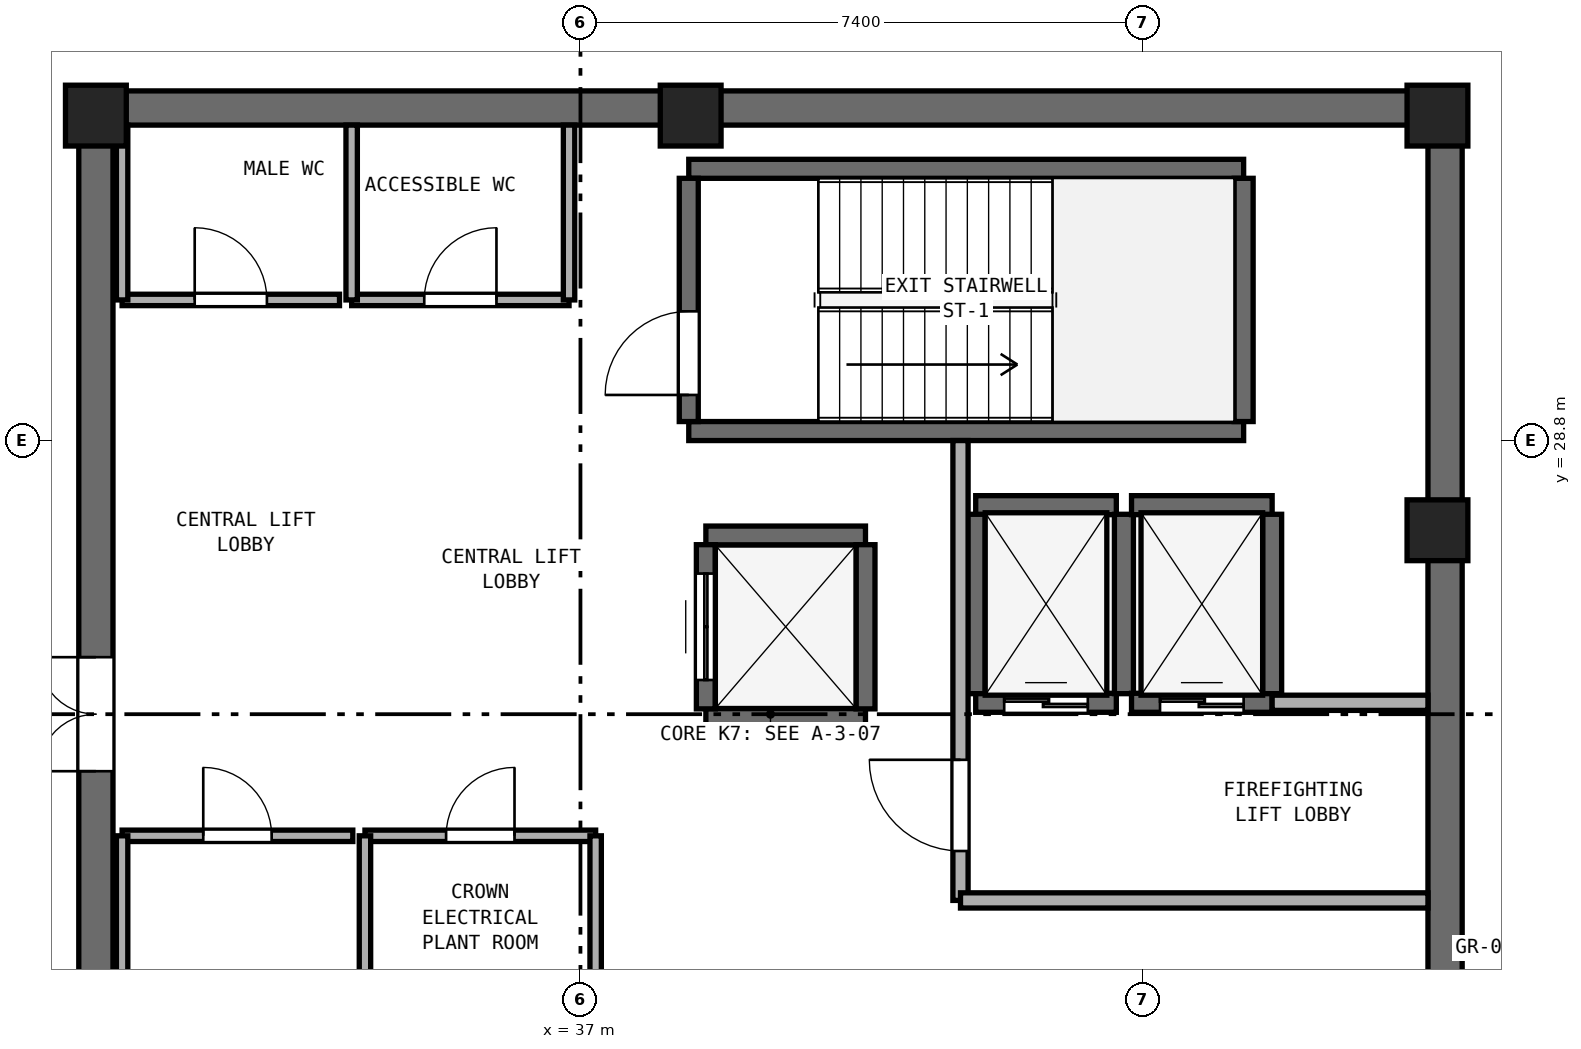
"""IFC4 building model, lengths in metres.
Left out: names, types, materials, properties, quantities, classifications, styles, units other than length and angle.
Written with IfcOpenShell. Run it as: python <this file> out.ifc"""

import sys

from ifc_helpers import new_model, si_unit, direction, frame, frame_2d, origin, origin_2d, place, context, subcontext, project, spatial, rectangle, extrude, element, fill, save


model = new_model("IFC4")
c1 = context("Model", 3, precision=1e-05, world=origin(), true_north=direction((0.0, 1.0)))
c2 = subcontext(c1, "Body", "Model", "MODEL_VIEW")
j1 = project(units=[si_unit("LENGTHUNIT", "METRE"), si_unit("PLANEANGLEUNIT", "RADIAN")], contexts=[c1])
p1 = place(None, origin())
s1 = spatial("IfcSite", under=j1, at=p1, CompositionType="ELEMENT")
p2 = place(p1, origin())
s2 = spatial("IfcBuilding", under=s1, at=p2, CompositionType="ELEMENT")
p3 = place(p2, frame((0.0, 0.0, 317.4)))
s3 = spatial("IfcBuildingStorey", under=s2, at=p3, CompositionType="ELEMENT", Elevation=317.4)
p4 = place(p3, frame((30.4, 33.175, 0.0), z_axis=(0.0, 0.0, 1.0), x_axis=(1.0, 0.0, 0.0)))
e1 = element("IfcWall", 1, at=p4, inside=s3, PredefinedType="SHEAR", context=c2, shape_type="SweptSolid", body=[
    extrude(rectangle(XDim=18.2, YDim=0.45, at=frame_2d((9.1, 0.0))), origin(), (0.0, 0.0, 1.0), 3.72),
])
p5 = place(p3, frame((30.625, 17.45, 0.0), z_axis=(0.0, 0.0, 1.0), x_axis=(0.0, 1.0, 0.0)))
e2 = element("IfcWall", 2, at=p5, inside=s3, PredefinedType="SHEAR", context=c2, shape_type="SweptSolid", body=[
    extrude(rectangle(XDim=15.5, YDim=0.45, at=frame_2d((7.75, 0.0))), origin(), (0.0, 0.0, 1.0), 3.72),
])
p6 = place(p5, frame((7.0, 0.0, 0.0)))
e3 = element("IfcOpeningElement", 3, at=p6, cuts=e2, PredefinedType="OPENING", context=c2, shape_type="SweptSolid", body=[
    extrude(rectangle(XDim=1.5, YDim=2.15, at=frame_2d((0.75, 1.075))), frame((0.0, 0.235, 0.0), z_axis=(0.0, -1.0, 0.0), x_axis=(1.0, 0.0, 0.0)), (0.0, 0.0, 1.0), 0.47),
])
p7 = place(p3, frame((48.375, 17.45, 0.0), z_axis=(0.0, 0.0, 1.0), x_axis=(0.0, 1.0, 0.0)))
e4 = element("IfcWall", 4, at=p7, inside=s3, PredefinedType="SHEAR", context=c2, shape_type="SweptSolid", body=[
    extrude(rectangle(XDim=15.5, YDim=0.45, at=frame_2d((7.75, 0.0))), origin(), (0.0, 0.0, 1.0), 3.72),
])
p8 = place(p7, frame((2.55, 0.0, 0.0)))
e5 = element("IfcOpeningElement", 5, at=p8, cuts=e4, PredefinedType="OPENING", context=c2, shape_type="SweptSolid", body=[
    extrude(rectangle(XDim=1.5, YDim=2.15, at=frame_2d((0.75, 1.075))), frame((0.0, 0.235, 0.0), z_axis=(0.0, -1.0, 0.0), x_axis=(1.0, 0.0, 0.0)), (0.0, 0.0, 1.0), 0.47),
])
for number, where, z_axis, x_axis in (
    (6, (48.275, 27.62, 0.0), (0.0, 0.0, 1.0), (1.0, 0.0, 0.0)),
    (7, (48.275, 33.075, 0.0), (0.0, 0.0, 1.0), (1.0, 0.0, 0.0)),
    (8, (38.45, 33.075, 0.0), (0.0, 0.0, 1.0), (1.0, 0.0, 0.0)),
    (9, (30.625, 33.075, 0.0), (0.0, 0.0, 1.0), (1.0, 0.0, 0.0)),
):
    element("IfcColumn", number, at=place(p3, frame(where, z_axis=z_axis, x_axis=x_axis)), inside=s3, PredefinedType="PILASTER", context=c2, shape_type="SweptSolid", body=[
        extrude(rectangle(XDim=0.8, YDim=0.8, at=origin_2d()), origin(), (0.0, 0.0, 1.0), 4.0),
    ])
for number, where, z_axis, x_axis in (
    (10, (38.425, 28.925, 0.0), (0.0, 0.0, 1.0), (1.0, 0.0, 0.0)),
    (11, (38.425, 32.375, 0.0), (0.0, 0.0, 1.0), (1.0, 0.0, 0.0)),
):
    element("IfcWall", number, at=place(p3, frame(where, z_axis=z_axis, x_axis=x_axis)), inside=s3, PredefinedType="SHEAR", context=c2, shape_type="SweptSolid", body=[
        extrude(rectangle(XDim=7.3, YDim=0.25, at=frame_2d((3.65, 0.0))), origin(), (0.0, 0.0, 1.0), 3.72),
    ])
p9 = place(p3, frame((38.425, 29.05, 0.0), z_axis=(0.0, 0.0, 1.0), x_axis=(0.0, 1.0, 0.0)))
e12 = element("IfcWall", 12, at=p9, inside=s3, PredefinedType="SHEAR", context=c2, shape_type="SweptSolid", body=[
    extrude(rectangle(XDim=3.2, YDim=0.25, at=frame_2d((1.6, 0.0))), origin(), (0.0, 0.0, 1.0), 3.72),
])
p10 = place(p9, frame((0.35, 0.0, 0.0)))
e13 = element("IfcOpeningElement", 13, at=p10, cuts=e12, PredefinedType="OPENING", context=c2, shape_type="SweptSolid", body=[
    extrude(rectangle(XDim=1.1, YDim=2.15, at=frame_2d((0.55, 1.075))), frame((0.0, 0.135, 0.0), z_axis=(0.0, -1.0, 0.0), x_axis=(1.0, 0.0, 0.0)), (0.0, 0.0, 1.0), 0.27),
])
p11 = place(p3, frame((45.725, 29.05, 0.0), z_axis=(0.0, 0.0, 1.0), x_axis=(0.0, 1.0, 0.0)))
e14 = element("IfcWall", 14, at=p11, inside=s3, PredefinedType="SHEAR", context=c2, shape_type="SweptSolid", body=[
    extrude(rectangle(XDim=3.2, YDim=0.25, at=frame_2d((1.6, 0.0))), origin(), (0.0, 0.0, 1.0), 3.72),
])
p12 = place(p3, frame((42.2, 25.35, 0.0), z_axis=(0.0, 0.0, 1.0), x_axis=(1.0, 0.0, 0.0)))
e15 = element("IfcWall", 15, at=p12, inside=s3, PredefinedType="SHEAR", context=c2, shape_type="SweptSolid", body=[
    extrude(rectangle(XDim=1.85, YDim=0.25, at=frame_2d((0.925, 0.0))), origin(), (0.0, 0.0, 1.0), 3.72),
])
p13 = place(p12, frame((0.375, 0.0, 0.0)))
e16 = element("IfcOpeningElement", 16, at=p13, cuts=e15, PredefinedType="OPENING", context=c2, shape_type="SweptSolid", body=[
    extrude(rectangle(XDim=1.1, YDim=2.15, at=frame_2d((0.55, 1.075))), frame((0.0, 0.135, 0.0), z_axis=(0.0, -1.0, 0.0), x_axis=(1.0, 0.0, 0.0)), (0.0, 0.0, 1.0), 0.27),
])
p14 = place(p3, frame((42.2, 27.95, 0.0), z_axis=(0.0, 0.0, 1.0), x_axis=(1.0, 0.0, 0.0)))
e17 = element("IfcWall", 17, at=p14, inside=s3, PredefinedType="SHEAR", context=c2, shape_type="SweptSolid", body=[
    extrude(rectangle(XDim=1.85, YDim=0.25, at=frame_2d((0.925, 0.0))), origin(), (0.0, 0.0, 1.0), 3.72),
])
for number, where, z_axis, x_axis in (
    (18, (42.2, 25.47, 0.0), (0.0, 0.0, 1.0), (0.0, 1.0, 0.0)),
    (19, (44.15, 25.47, 0.0), (0.0, 0.0, 1.0), (0.0, 1.0, 0.0)),
):
    element("IfcWall", number, at=place(p3, frame(where, z_axis=z_axis, x_axis=x_axis)), inside=s3, PredefinedType="SHEAR", context=c2, shape_type="SweptSolid", body=[
        extrude(rectangle(XDim=2.36, YDim=0.25, at=frame_2d((1.18, 0.0))), origin(), (0.0, 0.0, 1.0), 3.72),
    ])
p15 = place(p3, frame((44.25, 25.35, 0.0), z_axis=(0.0, 0.0, 1.0), x_axis=(1.0, 0.0, 0.0)))
e20 = element("IfcWall", 20, at=p15, inside=s3, PredefinedType="SHEAR", context=c2, shape_type="SweptSolid", body=[
    extrude(rectangle(XDim=1.85, YDim=0.25, at=frame_2d((0.925, 0.0))), origin(), (0.0, 0.0, 1.0), 3.72),
])
p16 = place(p15, frame((0.375, 0.0, 0.0)))
e21 = element("IfcOpeningElement", 21, at=p16, cuts=e20, PredefinedType="OPENING", context=c2, shape_type="SweptSolid", body=[
    extrude(rectangle(XDim=1.1, YDim=2.15, at=frame_2d((0.55, 1.075))), frame((0.0, 0.135, 0.0), z_axis=(0.0, -1.0, 0.0), x_axis=(1.0, 0.0, 0.0)), (0.0, 0.0, 1.0), 0.27),
])
p17 = place(p3, frame((44.25, 27.95, 0.0), z_axis=(0.0, 0.0, 1.0), x_axis=(1.0, 0.0, 0.0)))
e22 = element("IfcWall", 22, at=p17, inside=s3, PredefinedType="SHEAR", context=c2, shape_type="SweptSolid", body=[
    extrude(rectangle(XDim=1.85, YDim=0.25, at=frame_2d((0.925, 0.0))), origin(), (0.0, 0.0, 1.0), 3.72),
])
p18 = place(p3, frame((46.1, 25.47, 0.0), z_axis=(0.0, 0.0, 1.0), x_axis=(0.0, 1.0, 0.0)))
e23 = element("IfcWall", 23, at=p18, inside=s3, PredefinedType="SHEAR", context=c2, shape_type="SweptSolid", body=[
    extrude(rectangle(XDim=2.36, YDim=0.25, at=frame_2d((1.18, 0.0))), origin(), (0.0, 0.0, 1.0), 3.72),
])
for number, where, z_axis, x_axis in (
    (24, (38.65, 25.15, 0.0), (0.0, 0.0, 1.0), (1.0, 0.0, 0.0)),
    (25, (38.65, 27.55, 0.0), (0.0, 0.0, 1.0), (1.0, 0.0, 0.0)),
):
    element("IfcWall", number, at=place(p3, frame(where, z_axis=z_axis, x_axis=x_axis)), inside=s3, PredefinedType="SHEAR", context=c2, shape_type="SweptSolid", body=[
        extrude(rectangle(XDim=2.1, YDim=0.25, at=frame_2d((1.05, 0.0))), origin(), (0.0, 0.0, 1.0), 3.72),
    ])
p19 = place(p3, frame((38.65, 25.27, 0.0), z_axis=(0.0, 0.0, 1.0), x_axis=(0.0, 1.0, 0.0)))
e26 = element("IfcWall", 26, at=p19, inside=s3, PredefinedType="SHEAR", context=c2, shape_type="SweptSolid", body=[
    extrude(rectangle(XDim=2.16, YDim=0.25, at=frame_2d((1.08, 0.0))), origin(), (0.0, 0.0, 1.0), 3.72),
])
p20 = place(p19, frame((0.38, 0.0, 0.0)))
e27 = element("IfcOpeningElement", 27, at=p20, cuts=e26, PredefinedType="OPENING", context=c2, shape_type="SweptSolid", body=[
    extrude(rectangle(XDim=1.4, YDim=2.2, at=frame_2d((0.7, 1.1))), frame((0.0, 0.135, 0.0), z_axis=(0.0, -1.0, 0.0), x_axis=(1.0, 0.0, 0.0)), (0.0, 0.0, 1.0), 0.27),
])
p21 = place(p3, frame((40.75, 25.27, 0.0), z_axis=(0.0, 0.0, 1.0), x_axis=(0.0, 1.0, 0.0)))
e28 = element("IfcWall", 28, at=p21, inside=s3, PredefinedType="SHEAR", context=c2, shape_type="SweptSolid", body=[
    extrude(rectangle(XDim=2.16, YDim=0.25, at=frame_2d((1.08, 0.0))), origin(), (0.0, 0.0, 1.0), 3.72),
])
p22 = place(p3, frame((42.0, 22.75, 0.0), z_axis=(0.0, 0.0, 1.0), x_axis=(0.0, 1.0, 0.0)))
e29 = element("IfcWall", 29, at=p22, inside=s3, PredefinedType="SOLIDWALL", context=c2, shape_type="SweptSolid", body=[
    extrude(rectangle(XDim=6.05, YDim=0.2, at=frame_2d((3.025, 0.0))), origin(), (0.0, 0.0, 1.0), 3.72),
])
p23 = place(p22, frame((0.65, 0.0, 0.0)))
e30 = element("IfcOpeningElement", 30, at=p23, cuts=e29, PredefinedType="OPENING", context=c2, shape_type="SweptSolid", body=[
    extrude(rectangle(XDim=1.2, YDim=2.15, at=frame_2d((0.6, 1.075))), frame((0.0, 0.11, 0.0), z_axis=(0.0, -1.0, 0.0), x_axis=(1.0, 0.0, 0.0)), (0.0, 0.0, 1.0), 0.22),
])
p24 = place(p3, frame((42.0, 22.75, 0.0), z_axis=(0.0, 0.0, 1.0), x_axis=(1.0, 0.0, 0.0)))
e31 = element("IfcWall", 31, at=p24, inside=s3, PredefinedType="SOLIDWALL", context=c2, shape_type="SweptSolid", body=[
    extrude(rectangle(XDim=6.15, YDim=0.2, at=frame_2d((3.075, 0.0))), origin(), (0.0, 0.0, 1.0), 3.72),
])
p25 = place(p3, frame((46.1, 25.35, 0.0), z_axis=(0.0, 0.0, 1.0), x_axis=(1.0, 0.0, 0.0)))
e32 = element("IfcWall", 32, at=p25, inside=s3, PredefinedType="SOLIDWALL", context=c2, shape_type="SweptSolid", body=[
    extrude(rectangle(XDim=2.05, YDim=0.2, at=frame_2d((1.025, 0.0))), origin(), (0.0, 0.0, 1.0), 3.72),
])
p26 = place(p3, frame((30.97, 30.65, 0.0), z_axis=(0.0, 0.0, 1.0), x_axis=(1.0, 0.0, 0.0)))
e33 = element("IfcWall", 33, at=p26, inside=s3, PredefinedType="PARTITIONING", context=c2, shape_type="SweptSolid", body=[
    extrude(rectangle(XDim=2.86, YDim=0.15, at=frame_2d((1.43, 0.0))), origin(), (0.0, 0.0, 1.0), 3.72),
])
p27 = place(p26, frame((0.955, 0.0, 0.0)))
e34 = element("IfcOpeningElement", 34, at=p27, cuts=e33, PredefinedType="OPENING", context=c2, shape_type="SweptSolid", body=[
    extrude(rectangle(XDim=0.95, YDim=2.1, at=frame_2d((0.475, 1.05))), frame((0.0, 0.085, 0.0), z_axis=(0.0, -1.0, 0.0), x_axis=(1.0, 0.0, 0.0)), (0.0, 0.0, 1.0), 0.17),
])
p28 = place(p3, frame((30.97, 30.65, 0.0), z_axis=(0.0, 0.0, 1.0), x_axis=(0.0, 1.0, 0.0)))
e35 = element("IfcWall", 35, at=p28, inside=s3, PredefinedType="PARTITIONING", context=c2, shape_type="SweptSolid", body=[
    extrude(rectangle(XDim=2.3, YDim=0.15, at=frame_2d((1.15, 0.0))), origin(), (0.0, 0.0, 1.0), 2.82),
])
p29 = place(p3, frame((33.99, 30.65, 0.0), z_axis=(0.0, 0.0, 1.0), x_axis=(1.0, 0.0, 0.0)))
e36 = element("IfcWall", 36, at=p29, inside=s3, PredefinedType="PARTITIONING", context=c2, shape_type="SweptSolid", body=[
    extrude(rectangle(XDim=2.86, YDim=0.15, at=frame_2d((1.43, 0.0))), origin(), (0.0, 0.0, 1.0), 3.72),
])
p30 = place(p29, frame((0.955, 0.0, 0.0)))
e37 = element("IfcOpeningElement", 37, at=p30, cuts=e36, PredefinedType="OPENING", context=c2, shape_type="SweptSolid", body=[
    extrude(rectangle(XDim=0.95, YDim=2.1, at=frame_2d((0.475, 1.05))), frame((0.0, 0.085, 0.0), z_axis=(0.0, -1.0, 0.0), x_axis=(1.0, 0.0, 0.0)), (0.0, 0.0, 1.0), 0.17),
])
for number, where, z_axis, x_axis in (
    (38, (33.99, 30.65, 0.0), (0.0, 0.0, 1.0), (0.0, 1.0, 0.0)),
    (39, (36.85, 30.65, 0.0), (0.0, 0.0, 1.0), (0.0, 1.0, 0.0)),
):
    element("IfcWall", number, at=place(p3, frame(where, z_axis=z_axis, x_axis=x_axis)), inside=s3, PredefinedType="PARTITIONING", context=c2, shape_type="SweptSolid", body=[
        extrude(rectangle(XDim=2.3, YDim=0.15, at=frame_2d((1.15, 0.0))), origin(), (0.0, 0.0, 1.0), 3.72),
    ])
p31 = place(p3, frame((30.97, 23.6, 0.0), z_axis=(0.0, 0.0, 1.0), x_axis=(1.0, 0.0, 0.0)))
e40 = element("IfcWall", 40, at=p31, inside=s3, PredefinedType="PARTITIONING", context=c2, shape_type="SweptSolid", body=[
    extrude(rectangle(XDim=3.035, YDim=0.15, at=frame_2d((1.518, 0.0))), origin(), (0.0, 0.0, 1.0), 3.72),
])
p32 = place(p31, frame((1.067, 0.0, 0.0)))
e41 = element("IfcOpeningElement", 41, at=p32, cuts=e40, PredefinedType="OPENING", context=c2, shape_type="SweptSolid", body=[
    extrude(rectangle(XDim=0.9, YDim=2.1, at=frame_2d((0.45, 1.05))), frame((0.0, 0.085, 0.0), z_axis=(0.0, -1.0, 0.0), x_axis=(1.0, 0.0, 0.0)), (0.0, 0.0, 1.0), 0.17),
])
p33 = place(p3, frame((30.97, 21.4, 0.0), z_axis=(0.0, 0.0, 1.0), x_axis=(0.0, 1.0, 0.0)))
e42 = element("IfcWall", 42, at=p33, inside=s3, PredefinedType="PARTITIONING", context=c2, shape_type="SweptSolid", body=[
    extrude(rectangle(XDim=2.2, YDim=0.15, at=frame_2d((1.1, 0.0))), origin(), (0.0, 0.0, 1.0), 2.82),
])
p34 = place(p3, frame((34.165, 23.6, 0.0), z_axis=(0.0, 0.0, 1.0), x_axis=(1.0, 0.0, 0.0)))
e43 = element("IfcWall", 43, at=p34, inside=s3, PredefinedType="PARTITIONING", context=c2, shape_type="SweptSolid", body=[
    extrude(rectangle(XDim=3.035, YDim=0.15, at=frame_2d((1.518, 0.0))), origin(), (0.0, 0.0, 1.0), 3.72),
])
p35 = place(p34, frame((1.067, 0.0, 0.0)))
e44 = element("IfcOpeningElement", 44, at=p35, cuts=e43, PredefinedType="OPENING", context=c2, shape_type="SweptSolid", body=[
    extrude(rectangle(XDim=0.9, YDim=2.1, at=frame_2d((0.45, 1.05))), frame((0.0, 0.085, 0.0), z_axis=(0.0, -1.0, 0.0), x_axis=(1.0, 0.0, 0.0)), (0.0, 0.0, 1.0), 0.17),
])
for number, where, z_axis, x_axis in (
    (45, (34.165, 21.4, 0.0), (0.0, 0.0, 1.0), (0.0, 1.0, 0.0)),
    (46, (37.2, 21.4, 0.0), (0.0, 0.0, 1.0), (0.0, 1.0, 0.0)),
):
    element("IfcWall", number, at=place(p3, frame(where, z_axis=z_axis, x_axis=x_axis)), inside=s3, PredefinedType="PARTITIONING", context=c2, shape_type="SweptSolid", body=[
        extrude(rectangle(XDim=2.2, YDim=0.15, at=frame_2d((1.1, 0.0))), origin(), (0.0, 0.0, 1.0), 3.72),
    ])
p36 = place(p10, origin())
e47 = element("IfcDoor", 47, at=p36, inside=s3, OperationType="SINGLE_SWING_LEFT", PredefinedType="DOOR", context=c2, shape_type="SweptSolid", body=[
    extrude(rectangle(XDim=1.1, YDim=2.15, at=frame_2d((0.55, 1.075))), frame((0.0, 0.025, 0.0), z_axis=(0.0, -1.0, 0.0), x_axis=(1.0, 0.0, 0.0)), (0.0, 0.0, 1.0), 0.05),
])
fill(e13, e47)
p37 = place(p13, origin())
e48 = element("IfcDoor", 48, at=p37, inside=s3, OperationType="DOUBLE_DOOR_SLIDING", PredefinedType="DOOR", context=c2, shape_type="SweptSolid", body=[
    extrude(rectangle(XDim=1.1, YDim=2.15, at=frame_2d((0.55, 1.075))), frame((0.0, 0.025, 0.0), z_axis=(0.0, -1.0, 0.0), x_axis=(1.0, 0.0, 0.0)), (0.0, 0.0, 1.0), 0.05),
])
fill(e16, e48)
p38 = place(p16, origin())
e49 = element("IfcDoor", 49, at=p38, inside=s3, OperationType="DOUBLE_DOOR_SLIDING", PredefinedType="DOOR", context=c2, shape_type="SweptSolid", body=[
    extrude(rectangle(XDim=1.1, YDim=2.15, at=frame_2d((0.55, 1.075))), frame((0.0, 0.025, 0.0), z_axis=(0.0, -1.0, 0.0), x_axis=(1.0, 0.0, 0.0)), (0.0, 0.0, 1.0), 0.05),
])
fill(e21, e49)
p39 = place(p20, origin())
e50 = element("IfcDoor", 50, at=p39, inside=s3, OperationType="DOUBLE_DOOR_SLIDING", PredefinedType="DOOR", context=c2, shape_type="SweptSolid", body=[
    extrude(rectangle(XDim=1.4, YDim=2.2, at=frame_2d((0.7, 1.1))), frame((0.0, 0.025, 0.0), z_axis=(0.0, -1.0, 0.0), x_axis=(1.0, 0.0, 0.0)), (0.0, 0.0, 1.0), 0.05),
])
fill(e27, e50)
p40 = place(p23, origin())
e51 = element("IfcDoor", 51, at=p40, inside=s3, OperationType="SINGLE_SWING_RIGHT", PredefinedType="DOOR", context=c2, shape_type="SweptSolid", body=[
    extrude(rectangle(XDim=1.2, YDim=2.15, at=frame_2d((0.6, 1.075))), frame((0.0, 0.025, 0.0), z_axis=(0.0, -1.0, 0.0), x_axis=(1.0, 0.0, 0.0)), (0.0, 0.0, 1.0), 0.05),
])
fill(e30, e51)
p41 = place(p6, origin())
e52 = element("IfcDoor", 52, at=p41, inside=s3, OperationType="DOUBLE_DOOR_SINGLE_SWING", PredefinedType="DOOR", context=c2, shape_type="SweptSolid", body=[
    extrude(rectangle(XDim=1.5, YDim=2.15, at=frame_2d((0.75, 1.075))), frame((0.0, 0.025, 0.0), z_axis=(0.0, -1.0, 0.0), x_axis=(1.0, 0.0, 0.0)), (0.0, 0.0, 1.0), 0.05),
])
fill(e3, e52)
p42 = place(p27, origin())
e53 = element("IfcDoor", 53, at=p42, inside=s3, OperationType="SINGLE_SWING_LEFT", PredefinedType="DOOR", context=c2, shape_type="SweptSolid", body=[
    extrude(rectangle(XDim=0.95, YDim=2.1, at=frame_2d((0.475, 1.05))), frame((0.0, 0.025, 0.0), z_axis=(0.0, -1.0, 0.0), x_axis=(1.0, 0.0, 0.0)), (0.0, 0.0, 1.0), 0.05),
])
fill(e34, e53)
p43 = place(p30, origin())
e54 = element("IfcDoor", 54, at=p43, inside=s3, OperationType="SINGLE_SWING_RIGHT", PredefinedType="DOOR", context=c2, shape_type="SweptSolid", body=[
    extrude(rectangle(XDim=0.95, YDim=2.1, at=frame_2d((0.475, 1.05))), frame((0.0, 0.025, 0.0), z_axis=(0.0, -1.0, 0.0), x_axis=(1.0, 0.0, 0.0)), (0.0, 0.0, 1.0), 0.05),
])
fill(e37, e54)
p44 = place(p32, origin())
e55 = element("IfcDoor", 55, at=p44, inside=s3, OperationType="SINGLE_SWING_LEFT", PredefinedType="DOOR", context=c2, shape_type="SweptSolid", body=[
    extrude(rectangle(XDim=0.9, YDim=2.1, at=frame_2d((0.45, 1.05))), frame((0.0, 0.025, 0.0), z_axis=(0.0, -1.0, 0.0), x_axis=(1.0, 0.0, 0.0)), (0.0, 0.0, 1.0), 0.05),
])
fill(e41, e55)
p45 = place(p35, origin())
e56 = element("IfcDoor", 56, at=p45, inside=s3, OperationType="SINGLE_SWING_RIGHT", PredefinedType="DOOR", context=c2, shape_type="SweptSolid", body=[
    extrude(rectangle(XDim=0.9, YDim=2.1, at=frame_2d((0.45, 1.05))), frame((0.0, 0.025, 0.0), z_axis=(0.0, -1.0, 0.0), x_axis=(1.0, 0.0, 0.0)), (0.0, 0.0, 1.0), 0.05),
])
fill(e44, e56)
save(model, sys.argv[1])
